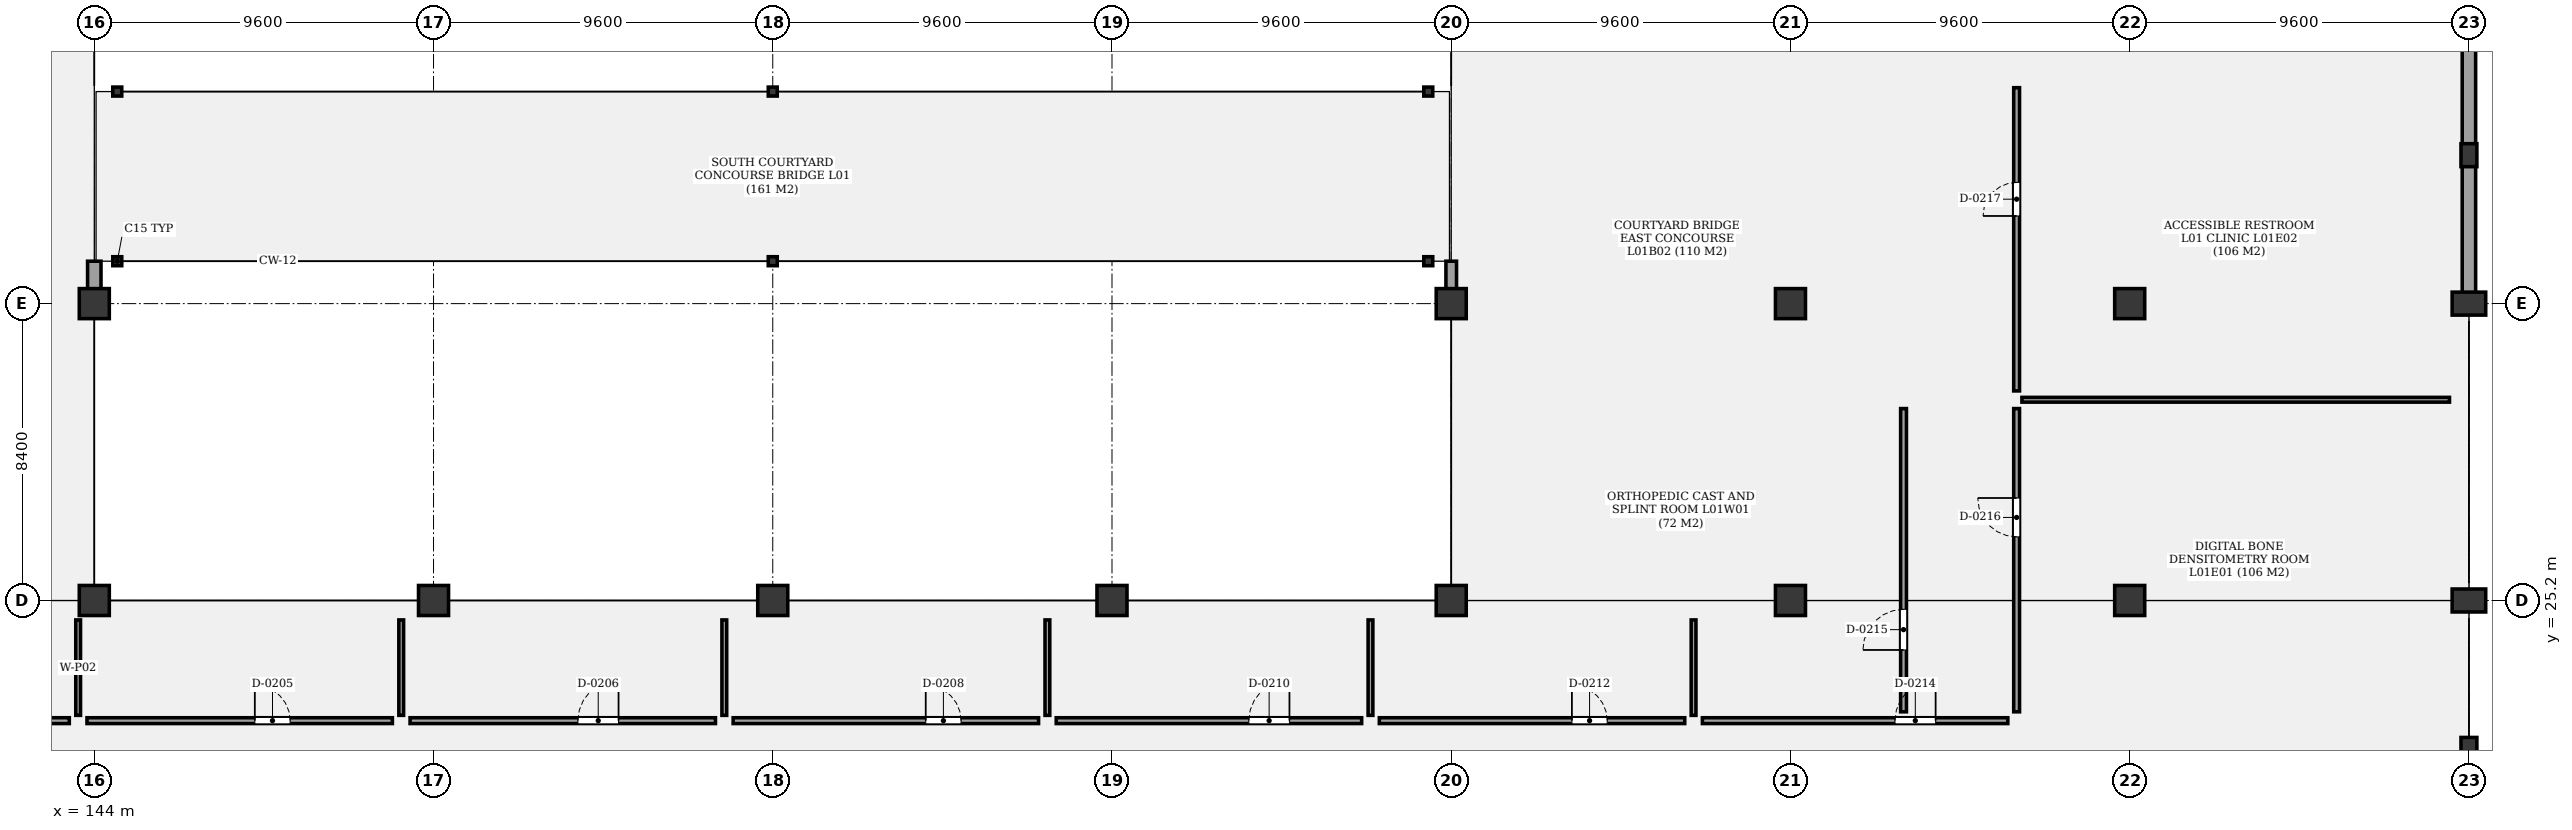
"""IFC4 building model, lengths in metres.
Left out: names, types, materials, properties, quantities, classifications, styles, units other than length and angle.
Written with IfcOpenShell. Run it as: python <this file> out.ifc"""

import sys

from ifc_helpers import new_model, si_unit, direction, frame, frame_2d, origin, origin_2d, place, context, subcontext, project, spatial, rectangle, hollow_rectangle, extrude, element, fill, save


model = new_model("IFC4")
c1 = context("Model", 3, precision=1e-05, world=origin(), true_north=direction((0.0, 1.0)))
c2 = subcontext(c1, "Body", "Model", "MODEL_VIEW")
j1 = project(units=[si_unit("LENGTHUNIT", "METRE"), si_unit("PLANEANGLEUNIT", "RADIAN")], contexts=[c1])
p1 = place(None, origin())
s1 = spatial("IfcSite", under=j1, at=p1, CompositionType="ELEMENT")
p2 = place(p1, origin())
s2 = spatial("IfcBuilding", under=s1, at=p2, CompositionType="ELEMENT")
p3 = place(p2, frame((0.0, 0.0, 5.1)))
s3 = spatial("IfcBuildingStorey", under=s2, at=p3, CompositionType="ELEMENT", Elevation=5.1)
for number, where, z_axis, x_axis in (
    (1, (144.0, 25.2, 0.0), (0.0, 0.0, 1.0), (1.0, 0.0, 0.0)),
    (2, (144.0, 33.6, 0.0), (0.0, 0.0, 1.0), (1.0, 0.0, 0.0)),
):
    element("IfcColumn", number, at=place(p3, frame(where, z_axis=z_axis, x_axis=x_axis)), inside=s3, PredefinedType="COLUMN", context=c2, shape_type="SweptSolid", body=[
        extrude(rectangle(XDim=0.85, YDim=0.85, at=origin_2d()), origin(), (0.0, 0.0, 1.0), 4.8),
    ])
for number, where, z_axis, x_axis in (
    (3, (144.65, 34.8, 0.0), (0.0, 0.0, 1.0), (1.0, 0.0, 0.0)),
    (4, (144.65, 39.6, 0.0), (0.0, 0.0, 1.0), (1.0, 0.0, 0.0)),
):
    element("IfcColumn", number, at=place(p3, frame(where, z_axis=z_axis, x_axis=x_axis)), inside=s3, PredefinedType="COLUMN", context=c2, shape_type="SweptSolid", body=[
        extrude(hollow_rectangle(XDim=0.254, YDim=0.254, WallThickness=0.013, at=origin_2d()), origin(), (0.0, 0.0, 1.0), 4.8),
    ])
for number, where, z_axis, x_axis in (
    (5, (153.6, 25.2, 0.0), (0.0, 0.0, 1.0), (1.0, 0.0, 0.0)),
    (6, (163.2, 25.2, 0.0), (0.0, 0.0, 1.0), (1.0, 0.0, 0.0)),
):
    element("IfcColumn", number, at=place(p3, frame(where, z_axis=z_axis, x_axis=x_axis)), inside=s3, PredefinedType="COLUMN", context=c2, shape_type="SweptSolid", body=[
        extrude(rectangle(XDim=0.85, YDim=0.85, at=origin_2d()), origin(), (0.0, 0.0, 1.0), 4.8),
    ])
for number, where, z_axis, x_axis in (
    (7, (163.2, 34.8, 0.0), (0.0, 0.0, 1.0), (1.0, 0.0, 0.0)),
    (8, (163.2, 39.6, 0.0), (0.0, 0.0, 1.0), (1.0, 0.0, 0.0)),
):
    element("IfcColumn", number, at=place(p3, frame(where, z_axis=z_axis, x_axis=x_axis)), inside=s3, PredefinedType="COLUMN", context=c2, shape_type="SweptSolid", body=[
        extrude(hollow_rectangle(XDim=0.254, YDim=0.254, WallThickness=0.013, at=origin_2d()), origin(), (0.0, 0.0, 1.0), 4.8),
    ])
p4 = place(p3, frame((172.8, 25.2, 0.0), z_axis=(0.0, 0.0, 1.0), x_axis=(1.0, 0.0, 0.0)))
e9 = element("IfcColumn", 9, at=p4, inside=s3, PredefinedType="COLUMN", context=c2, shape_type="SweptSolid", body=[
    extrude(rectangle(XDim=0.85, YDim=0.85, at=origin_2d()), origin(), (0.0, 0.0, 1.0), 4.8),
])
for number, where, z_axis, x_axis in (
    (10, (181.75, 34.8, 0.0), (0.0, 0.0, 1.0), (1.0, 0.0, 0.0)),
    (11, (181.75, 39.6, 0.0), (0.0, 0.0, 1.0), (1.0, 0.0, 0.0)),
):
    element("IfcColumn", number, at=place(p3, frame(where, z_axis=z_axis, x_axis=x_axis)), inside=s3, PredefinedType="COLUMN", context=c2, shape_type="SweptSolid", body=[
        extrude(hollow_rectangle(XDim=0.254, YDim=0.254, WallThickness=0.013, at=origin_2d()), origin(), (0.0, 0.0, 1.0), 4.8),
    ])
for number, where, z_axis, x_axis in (
    (12, (182.4, 25.2, 0.0), (0.0, 0.0, 1.0), (1.0, 0.0, 0.0)),
    (13, (182.4, 33.6, 0.0), (0.0, 0.0, 1.0), (1.0, 0.0, 0.0)),
    (14, (192.0, 25.2, 0.0), (0.0, 0.0, 1.0), (1.0, 0.0, 0.0)),
    (15, (192.0, 33.6, 0.0), (0.0, 0.0, 1.0), (1.0, 0.0, 0.0)),
    (16, (201.6, 25.2, 0.0), (0.0, 0.0, 1.0), (1.0, 0.0, 0.0)),
    (17, (201.6, 33.6, 0.0), (0.0, 0.0, 1.0), (1.0, 0.0, 0.0)),
):
    element("IfcColumn", number, at=place(p3, frame(where, z_axis=z_axis, x_axis=x_axis)), inside=s3, PredefinedType="COLUMN", context=c2, shape_type="SweptSolid", body=[
        extrude(rectangle(XDim=0.85, YDim=0.85, at=origin_2d()), origin(), (0.0, 0.0, 1.0), 4.8),
    ])
for number, where, z_axis, x_axis in (
    (18, (211.2, 25.2, 0.0), (0.0, 0.0, 1.0), (0.0, 1.0, 0.0)),
    (19, (211.2, 33.6, 0.0), (0.0, 0.0, 1.0), (0.0, 1.0, 0.0)),
):
    element("IfcColumn", number, at=place(p3, frame(where, z_axis=z_axis, x_axis=x_axis)), inside=s3, PredefinedType="COLUMN", context=c2, shape_type="SweptSolid", body=[
        extrude(rectangle(XDim=0.95, YDim=0.65, at=origin_2d()), origin(), (0.0, 0.0, 1.0), 4.8),
    ])
for number, where, z_axis, x_axis in (
    (20, (211.2, 21.0, 0.0), (0.0, 0.0, 1.0), (1.0, 0.0, 0.0)),
    (21, (211.2, 37.8, 0.0), (0.0, 0.0, 1.0), (1.0, 0.0, 0.0)),
):
    element("IfcColumn", number, at=place(p3, frame(where, z_axis=z_axis, x_axis=x_axis)), inside=s3, PredefinedType="PILASTER", context=c2, shape_type="SweptSolid", body=[
        extrude(rectangle(XDim=0.45, YDim=0.65, at=origin_2d()), origin(), (0.0, 0.0, 1.0), 4.8),
    ])
p5 = place(p3, frame((144.0, 34.8, 0.0), z_axis=(0.0, 0.0, 1.0), x_axis=(0.0, -1.0, 0.0)))
e22 = element("IfcWall", 22, at=p5, inside=s3, PredefinedType="SOLIDWALL", context=c2, shape_type="SweptSolid", body=[
    extrude(rectangle(XDim=1.2, YDim=0.38, at=frame_2d((0.6, 0.0))), origin(), (0.0, 0.0, 1.0), 3.94),
])
p6 = place(p3, frame((182.4, 33.6, 0.0), z_axis=(0.0, 0.0, 1.0), x_axis=(0.0, 1.0, 0.0)))
e23 = element("IfcWall", 23, at=p6, inside=s3, PredefinedType="SOLIDWALL", context=c2, shape_type="SweptSolid", body=[
    extrude(rectangle(XDim=1.2, YDim=0.3, at=frame_2d((0.6, 0.0))), origin(), (0.0, 0.0, 1.0), 3.94),
])
p7 = place(p3, frame((211.2, 67.04, 0.0), z_axis=(0.0, 0.0, 1.0), x_axis=(0.0, -1.0, 0.0)))
e24 = element("IfcWall", 24, at=p7, inside=s3, PredefinedType="SOLIDWALL", context=c2, shape_type="SweptSolid", body=[
    extrude(rectangle(XDim=33.44, YDim=0.38, at=frame_2d((16.72, 0.0))), origin(), (0.0, 0.0, 1.0), 3.94),
])
p8 = place(p7, frame((10.189, 0.0, 0.85)))
e25 = element("IfcOpeningElement", 25, at=p8, cuts=e24, PredefinedType="OPENING", context=c2, shape_type="SweptSolid", body=[
    extrude(rectangle(XDim=1.6, YDim=1.2, at=frame_2d((0.8, 0.6))), frame((0.0, 0.2, 0.0), z_axis=(0.0, -1.0, 0.0), x_axis=(1.0, 0.0, 0.0)), (0.0, 0.0, 1.0), 0.4),
])
p9 = place(p3, frame((134.65, 21.8, 0.0), z_axis=(0.0, 0.0, 1.0), x_axis=(1.0, 0.0, 0.0)))
e26 = element("IfcWall", 26, at=p9, inside=s3, PredefinedType="PARTITIONING", context=c2, shape_type="SweptSolid", body=[
    extrude(rectangle(XDim=8.643, YDim=0.165, at=frame_2d((4.322, 0.0))), origin(), (0.0, 0.0, 1.0), 3.68),
])
p10 = place(p9, frame((4.75, 0.0, 0.0)))
e27 = element("IfcOpeningElement", 27, at=p10, cuts=e26, PredefinedType="OPENING", context=c2, shape_type="SweptSolid", body=[
    extrude(rectangle(XDim=1.15, YDim=2.2, at=frame_2d((0.575, 1.1))), frame((0.0, 0.093, 0.0), z_axis=(0.0, -1.0, 0.0), x_axis=(1.0, 0.0, 0.0)), (0.0, 0.0, 1.0), 0.185),
])
p11 = place(p3, frame((143.793, 21.8, 0.0), z_axis=(0.0, 0.0, 1.0), x_axis=(1.0, 0.0, 0.0)))
e28 = element("IfcWall", 28, at=p11, inside=s3, PredefinedType="PARTITIONING", context=c2, shape_type="SweptSolid", body=[
    extrude(rectangle(XDim=8.643, YDim=0.165, at=frame_2d((4.322, 0.0))), origin(), (0.0, 0.0, 1.0), 3.68),
])
p12 = place(p11, frame((4.75, 0.0, 0.0)))
e29 = element("IfcOpeningElement", 29, at=p12, cuts=e28, PredefinedType="OPENING", context=c2, shape_type="SweptSolid", body=[
    extrude(rectangle(XDim=1.0, YDim=2.2, at=frame_2d((0.5, 1.1))), frame((0.0, 0.093, 0.0), z_axis=(0.0, -1.0, 0.0), x_axis=(1.0, 0.0, 0.0)), (0.0, 0.0, 1.0), 0.185),
])
p13 = place(p3, frame((143.543, 21.95, 0.0), z_axis=(0.0, 0.0, 1.0), x_axis=(0.0, 1.0, 0.0)))
e30 = element("IfcWall", 30, at=p13, inside=s3, PredefinedType="PARTITIONING", context=c2, shape_type="SweptSolid", body=[
    extrude(rectangle(XDim=2.7, YDim=0.135, at=frame_2d((1.35, 0.0))), origin(), (0.0, 0.0, 1.0), 3.68),
])
p14 = place(p3, frame((152.936, 21.8, 0.0), z_axis=(0.0, 0.0, 1.0), x_axis=(1.0, 0.0, 0.0)))
e31 = element("IfcWall", 31, at=p14, inside=s3, PredefinedType="PARTITIONING", context=c2, shape_type="SweptSolid", body=[
    extrude(rectangle(XDim=8.643, YDim=0.165, at=frame_2d((4.322, 0.0))), origin(), (0.0, 0.0, 1.0), 3.68),
])
p15 = place(p14, frame((4.75, 0.0, 0.0)))
e32 = element("IfcOpeningElement", 32, at=p15, cuts=e31, PredefinedType="OPENING", context=c2, shape_type="SweptSolid", body=[
    extrude(rectangle(XDim=1.15, YDim=2.2, at=frame_2d((0.575, 1.1))), frame((0.0, 0.093, 0.0), z_axis=(0.0, -1.0, 0.0), x_axis=(1.0, 0.0, 0.0)), (0.0, 0.0, 1.0), 0.185),
])
p16 = place(p3, frame((152.686, 21.95, 0.0), z_axis=(0.0, 0.0, 1.0), x_axis=(0.0, 1.0, 0.0)))
e33 = element("IfcWall", 33, at=p16, inside=s3, PredefinedType="PARTITIONING", context=c2, shape_type="SweptSolid", body=[
    extrude(rectangle(XDim=2.7, YDim=0.135, at=frame_2d((1.35, 0.0))), origin(), (0.0, 0.0, 1.0), 3.68),
])
p17 = place(p3, frame((162.079, 21.8, 0.0), z_axis=(0.0, 0.0, 1.0), x_axis=(1.0, 0.0, 0.0)))
e34 = element("IfcWall", 34, at=p17, inside=s3, PredefinedType="PARTITIONING", context=c2, shape_type="SweptSolid", body=[
    extrude(rectangle(XDim=8.643, YDim=0.165, at=frame_2d((4.321, 0.0))), origin(), (0.0, 0.0, 1.0), 3.68),
])
p18 = place(p17, frame((5.45, 0.0, 0.0)))
e35 = element("IfcOpeningElement", 35, at=p18, cuts=e34, PredefinedType="OPENING", context=c2, shape_type="SweptSolid", body=[
    extrude(rectangle(XDim=1.0, YDim=2.2, at=frame_2d((0.5, 1.1))), frame((0.0, 0.093, 0.0), z_axis=(0.0, -1.0, 0.0), x_axis=(1.0, 0.0, 0.0)), (0.0, 0.0, 1.0), 0.185),
])
p19 = place(p3, frame((161.829, 21.95, 0.0), z_axis=(0.0, 0.0, 1.0), x_axis=(0.0, 1.0, 0.0)))
e36 = element("IfcWall", 36, at=p19, inside=s3, PredefinedType="PARTITIONING", context=c2, shape_type="SweptSolid", body=[
    extrude(rectangle(XDim=2.7, YDim=0.135, at=frame_2d((1.35, 0.0))), origin(), (0.0, 0.0, 1.0), 3.68),
])
p20 = place(p3, frame((171.222, 21.8, 0.0), z_axis=(0.0, 0.0, 1.0), x_axis=(1.0, 0.0, 0.0)))
e37 = element("IfcWall", 37, at=p20, inside=s3, PredefinedType="PARTITIONING", context=c2, shape_type="SweptSolid", body=[
    extrude(rectangle(XDim=8.643, YDim=0.165, at=frame_2d((4.322, 0.0))), origin(), (0.0, 0.0, 1.0), 3.68),
])
p21 = place(p20, frame((5.45, 0.0, 0.0)))
e38 = element("IfcOpeningElement", 38, at=p21, cuts=e37, PredefinedType="OPENING", context=c2, shape_type="SweptSolid", body=[
    extrude(rectangle(XDim=1.15, YDim=2.2, at=frame_2d((0.575, 1.1))), frame((0.0, 0.093, 0.0), z_axis=(0.0, -1.0, 0.0), x_axis=(1.0, 0.0, 0.0)), (0.0, 0.0, 1.0), 0.185),
])
p22 = place(p3, frame((170.972, 21.95, 0.0), z_axis=(0.0, 0.0, 1.0), x_axis=(0.0, 1.0, 0.0)))
e39 = element("IfcWall", 39, at=p22, inside=s3, PredefinedType="PARTITIONING", context=c2, shape_type="SweptSolid", body=[
    extrude(rectangle(XDim=2.7, YDim=0.135, at=frame_2d((1.35, 0.0))), origin(), (0.0, 0.0, 1.0), 3.68),
])
p23 = place(p3, frame((180.365, 21.8, 0.0), z_axis=(0.0, 0.0, 1.0), x_axis=(1.0, 0.0, 0.0)))
e40 = element("IfcWall", 40, at=p23, inside=s3, PredefinedType="PARTITIONING", context=c2, shape_type="SweptSolid", body=[
    extrude(rectangle(XDim=8.643, YDim=0.165, at=frame_2d((4.322, 0.0))), origin(), (0.0, 0.0, 1.0), 3.68),
])
p24 = place(p23, frame((5.45, 0.0, 0.0)))
e41 = element("IfcOpeningElement", 41, at=p24, cuts=e40, PredefinedType="OPENING", context=c2, shape_type="SweptSolid", body=[
    extrude(rectangle(XDim=1.0, YDim=2.2, at=frame_2d((0.5, 1.1))), frame((0.0, 0.093, 0.0), z_axis=(0.0, -1.0, 0.0), x_axis=(1.0, 0.0, 0.0)), (0.0, 0.0, 1.0), 0.185),
])
p25 = place(p3, frame((180.115, 21.95, 0.0), z_axis=(0.0, 0.0, 1.0), x_axis=(0.0, 1.0, 0.0)))
e42 = element("IfcWall", 42, at=p25, inside=s3, PredefinedType="PARTITIONING", context=c2, shape_type="SweptSolid", body=[
    extrude(rectangle(XDim=2.7, YDim=0.135, at=frame_2d((1.35, 0.0))), origin(), (0.0, 0.0, 1.0), 3.68),
])
p26 = place(p3, frame((189.508, 21.8, 0.0), z_axis=(0.0, 0.0, 1.0), x_axis=(1.0, 0.0, 0.0)))
e43 = element("IfcWall", 43, at=p26, inside=s3, PredefinedType="PARTITIONING", context=c2, shape_type="SweptSolid", body=[
    extrude(rectangle(XDim=8.643, YDim=0.165, at=frame_2d((4.321, 0.0))), origin(), (0.0, 0.0, 1.0), 3.68),
])
p27 = place(p26, frame((5.45, 0.0, 0.0)))
e44 = element("IfcOpeningElement", 44, at=p27, cuts=e43, PredefinedType="OPENING", context=c2, shape_type="SweptSolid", body=[
    extrude(rectangle(XDim=1.15, YDim=2.2, at=frame_2d((0.575, 1.1))), frame((0.0, 0.093, 0.0), z_axis=(0.0, -1.0, 0.0), x_axis=(1.0, 0.0, 0.0)), (0.0, 0.0, 1.0), 0.185),
])
p28 = place(p3, frame((189.258, 21.95, 0.0), z_axis=(0.0, 0.0, 1.0), x_axis=(0.0, 1.0, 0.0)))
e45 = element("IfcWall", 45, at=p28, inside=s3, PredefinedType="PARTITIONING", context=c2, shape_type="SweptSolid", body=[
    extrude(rectangle(XDim=2.7, YDim=0.135, at=frame_2d((1.35, 0.0))), origin(), (0.0, 0.0, 1.0), 3.68),
])
p29 = place(p3, frame((195.2, 22.05, 0.0), z_axis=(0.0, 0.0, 1.0), x_axis=(0.0, 1.0, 0.0)))
e46 = element("IfcWall", 46, at=p29, inside=s3, PredefinedType="PARTITIONING", context=c2, shape_type="SweptSolid", body=[
    extrude(rectangle(XDim=8.58, YDim=0.165, at=frame_2d((4.29, 0.0))), origin(), (0.0, 0.0, 1.0), 3.68),
])
p30 = place(p29, frame((1.75, 0.0, 0.0)))
e47 = element("IfcOpeningElement", 47, at=p30, cuts=e46, PredefinedType="OPENING", context=c2, shape_type="SweptSolid", body=[
    extrude(rectangle(XDim=1.15, YDim=2.2, at=frame_2d((0.575, 1.1))), frame((0.0, 0.093, 0.0), z_axis=(0.0, -1.0, 0.0), x_axis=(1.0, 0.0, 0.0)), (0.0, 0.0, 1.0), 0.185),
])
p31 = place(p3, frame((198.4, 22.05, 0.0), z_axis=(0.0, 0.0, 1.0), x_axis=(0.0, 1.0, 0.0)))
e48 = element("IfcWall", 48, at=p31, inside=s3, PredefinedType="PARTITIONING", context=c2, shape_type="SweptSolid", body=[
    extrude(rectangle(XDim=8.58, YDim=0.165, at=frame_2d((4.29, 0.0))), origin(), (0.0, 0.0, 1.0), 3.68),
])
p32 = place(p31, frame((4.95, 0.0, 0.0)))
e49 = element("IfcOpeningElement", 49, at=p32, cuts=e48, PredefinedType="OPENING", context=c2, shape_type="SweptSolid", body=[
    extrude(rectangle(XDim=1.1, YDim=2.1, at=frame_2d((0.55, 1.05))), frame((0.0, 0.093, 0.0), z_axis=(0.0, -1.0, 0.0), x_axis=(1.0, 0.0, 0.0)), (0.0, 0.0, 1.0), 0.185),
])
p33 = place(p3, frame((198.4, 31.13, 0.0), z_axis=(0.0, 0.0, 1.0), x_axis=(0.0, 1.0, 0.0)))
e50 = element("IfcWall", 50, at=p33, inside=s3, PredefinedType="PARTITIONING", context=c2, shape_type="SweptSolid", body=[
    extrude(rectangle(XDim=8.58, YDim=0.165, at=frame_2d((4.29, 0.0))), origin(), (0.0, 0.0, 1.0), 3.68),
])
p34 = place(p33, frame((4.95, 0.0, 0.0)))
e51 = element("IfcOpeningElement", 51, at=p34, cuts=e50, PredefinedType="OPENING", context=c2, shape_type="SweptSolid", body=[
    extrude(rectangle(XDim=0.95, YDim=2.1, at=frame_2d((0.475, 1.05))), frame((0.0, 0.093, 0.0), z_axis=(0.0, -1.0, 0.0), x_axis=(1.0, 0.0, 0.0)), (0.0, 0.0, 1.0), 0.185),
])
p35 = place(p3, frame((198.55, 30.88, 0.0), z_axis=(0.0, 0.0, 1.0), x_axis=(1.0, 0.0, 0.0)))
e52 = element("IfcWall", 52, at=p35, inside=s3, PredefinedType="PARTITIONING", context=c2, shape_type="SweptSolid", body=[
    extrude(rectangle(XDim=12.1, YDim=0.135, at=frame_2d((6.05, 0.0))), origin(), (0.0, 0.0, 1.0), 3.68),
])
p36 = place(p12, origin())
e53 = element("IfcDoor", 53, at=p36, inside=s3, OperationType="SINGLE_SWING_LEFT", PredefinedType="DOOR", context=c2, shape_type="SweptSolid", body=[
    extrude(rectangle(XDim=1.0, YDim=2.2, at=frame_2d((0.5, 1.1))), frame((0.0, 0.025, 0.0), z_axis=(0.0, -1.0, 0.0), x_axis=(1.0, 0.0, 0.0)), (0.0, 0.0, 1.0), 0.05),
])
fill(e29, e53)
p37 = place(p15, origin())
e54 = element("IfcDoor", 54, at=p37, inside=s3, OperationType="SINGLE_SWING_RIGHT", PredefinedType="DOOR", context=c2, shape_type="SweptSolid", body=[
    extrude(rectangle(XDim=1.15, YDim=2.2, at=frame_2d((0.575, 1.1))), frame((0.0, 0.025, 0.0), z_axis=(0.0, -1.0, 0.0), x_axis=(1.0, 0.0, 0.0)), (0.0, 0.0, 1.0), 0.05),
])
fill(e32, e54)
p38 = place(p18, origin())
e55 = element("IfcDoor", 55, at=p38, inside=s3, OperationType="SINGLE_SWING_LEFT", PredefinedType="DOOR", context=c2, shape_type="SweptSolid", body=[
    extrude(rectangle(XDim=1.0, YDim=2.2, at=frame_2d((0.5, 1.1))), frame((0.0, 0.025, 0.0), z_axis=(0.0, -1.0, 0.0), x_axis=(1.0, 0.0, 0.0)), (0.0, 0.0, 1.0), 0.05),
])
fill(e35, e55)
p39 = place(p21, origin())
e56 = element("IfcDoor", 56, at=p39, inside=s3, OperationType="SINGLE_SWING_RIGHT", PredefinedType="DOOR", context=c2, shape_type="SweptSolid", body=[
    extrude(rectangle(XDim=1.15, YDim=2.2, at=frame_2d((0.575, 1.1))), frame((0.0, 0.025, 0.0), z_axis=(0.0, -1.0, 0.0), x_axis=(1.0, 0.0, 0.0)), (0.0, 0.0, 1.0), 0.05),
])
fill(e38, e56)
p40 = place(p24, origin())
e57 = element("IfcDoor", 57, at=p40, inside=s3, OperationType="SINGLE_SWING_LEFT", PredefinedType="DOOR", context=c2, shape_type="SweptSolid", body=[
    extrude(rectangle(XDim=1.0, YDim=2.2, at=frame_2d((0.5, 1.1))), frame((0.0, 0.025, 0.0), z_axis=(0.0, -1.0, 0.0), x_axis=(1.0, 0.0, 0.0)), (0.0, 0.0, 1.0), 0.05),
])
fill(e41, e57)
p41 = place(p27, origin())
e58 = element("IfcDoor", 58, at=p41, inside=s3, OperationType="SINGLE_SWING_RIGHT", PredefinedType="DOOR", context=c2, shape_type="SweptSolid", body=[
    extrude(rectangle(XDim=1.15, YDim=2.2, at=frame_2d((0.575, 1.1))), frame((0.0, 0.025, 0.0), z_axis=(0.0, -1.0, 0.0), x_axis=(1.0, 0.0, 0.0)), (0.0, 0.0, 1.0), 0.05),
])
fill(e44, e58)
p42 = place(p30, origin())
e59 = element("IfcDoor", 59, at=p42, inside=s3, OperationType="SINGLE_SWING_LEFT", PredefinedType="DOOR", context=c2, shape_type="SweptSolid", body=[
    extrude(rectangle(XDim=1.15, YDim=2.2, at=frame_2d((0.575, 1.1))), frame((0.0, 0.025, 0.0), z_axis=(0.0, -1.0, 0.0), x_axis=(1.0, 0.0, 0.0)), (0.0, 0.0, 1.0), 0.05),
])
fill(e47, e59)
p43 = place(p32, origin())
e60 = element("IfcDoor", 60, at=p43, inside=s3, OperationType="SINGLE_SWING_RIGHT", PredefinedType="DOOR", context=c2, shape_type="SweptSolid", body=[
    extrude(rectangle(XDim=1.1, YDim=2.1, at=frame_2d((0.55, 1.05))), frame((0.0, 0.025, 0.0), z_axis=(0.0, -1.0, 0.0), x_axis=(1.0, 0.0, 0.0)), (0.0, 0.0, 1.0), 0.05),
])
fill(e49, e60)
p44 = place(p34, origin())
e61 = element("IfcDoor", 61, at=p44, inside=s3, OperationType="SINGLE_SWING_LEFT", PredefinedType="DOOR", context=c2, shape_type="SweptSolid", body=[
    extrude(rectangle(XDim=0.95, YDim=2.1, at=frame_2d((0.475, 1.05))), frame((0.0, 0.025, 0.0), z_axis=(0.0, -1.0, 0.0), x_axis=(1.0, 0.0, 0.0)), (0.0, 0.0, 1.0), 0.05),
])
fill(e51, e61)
save(model, sys.argv[1])
